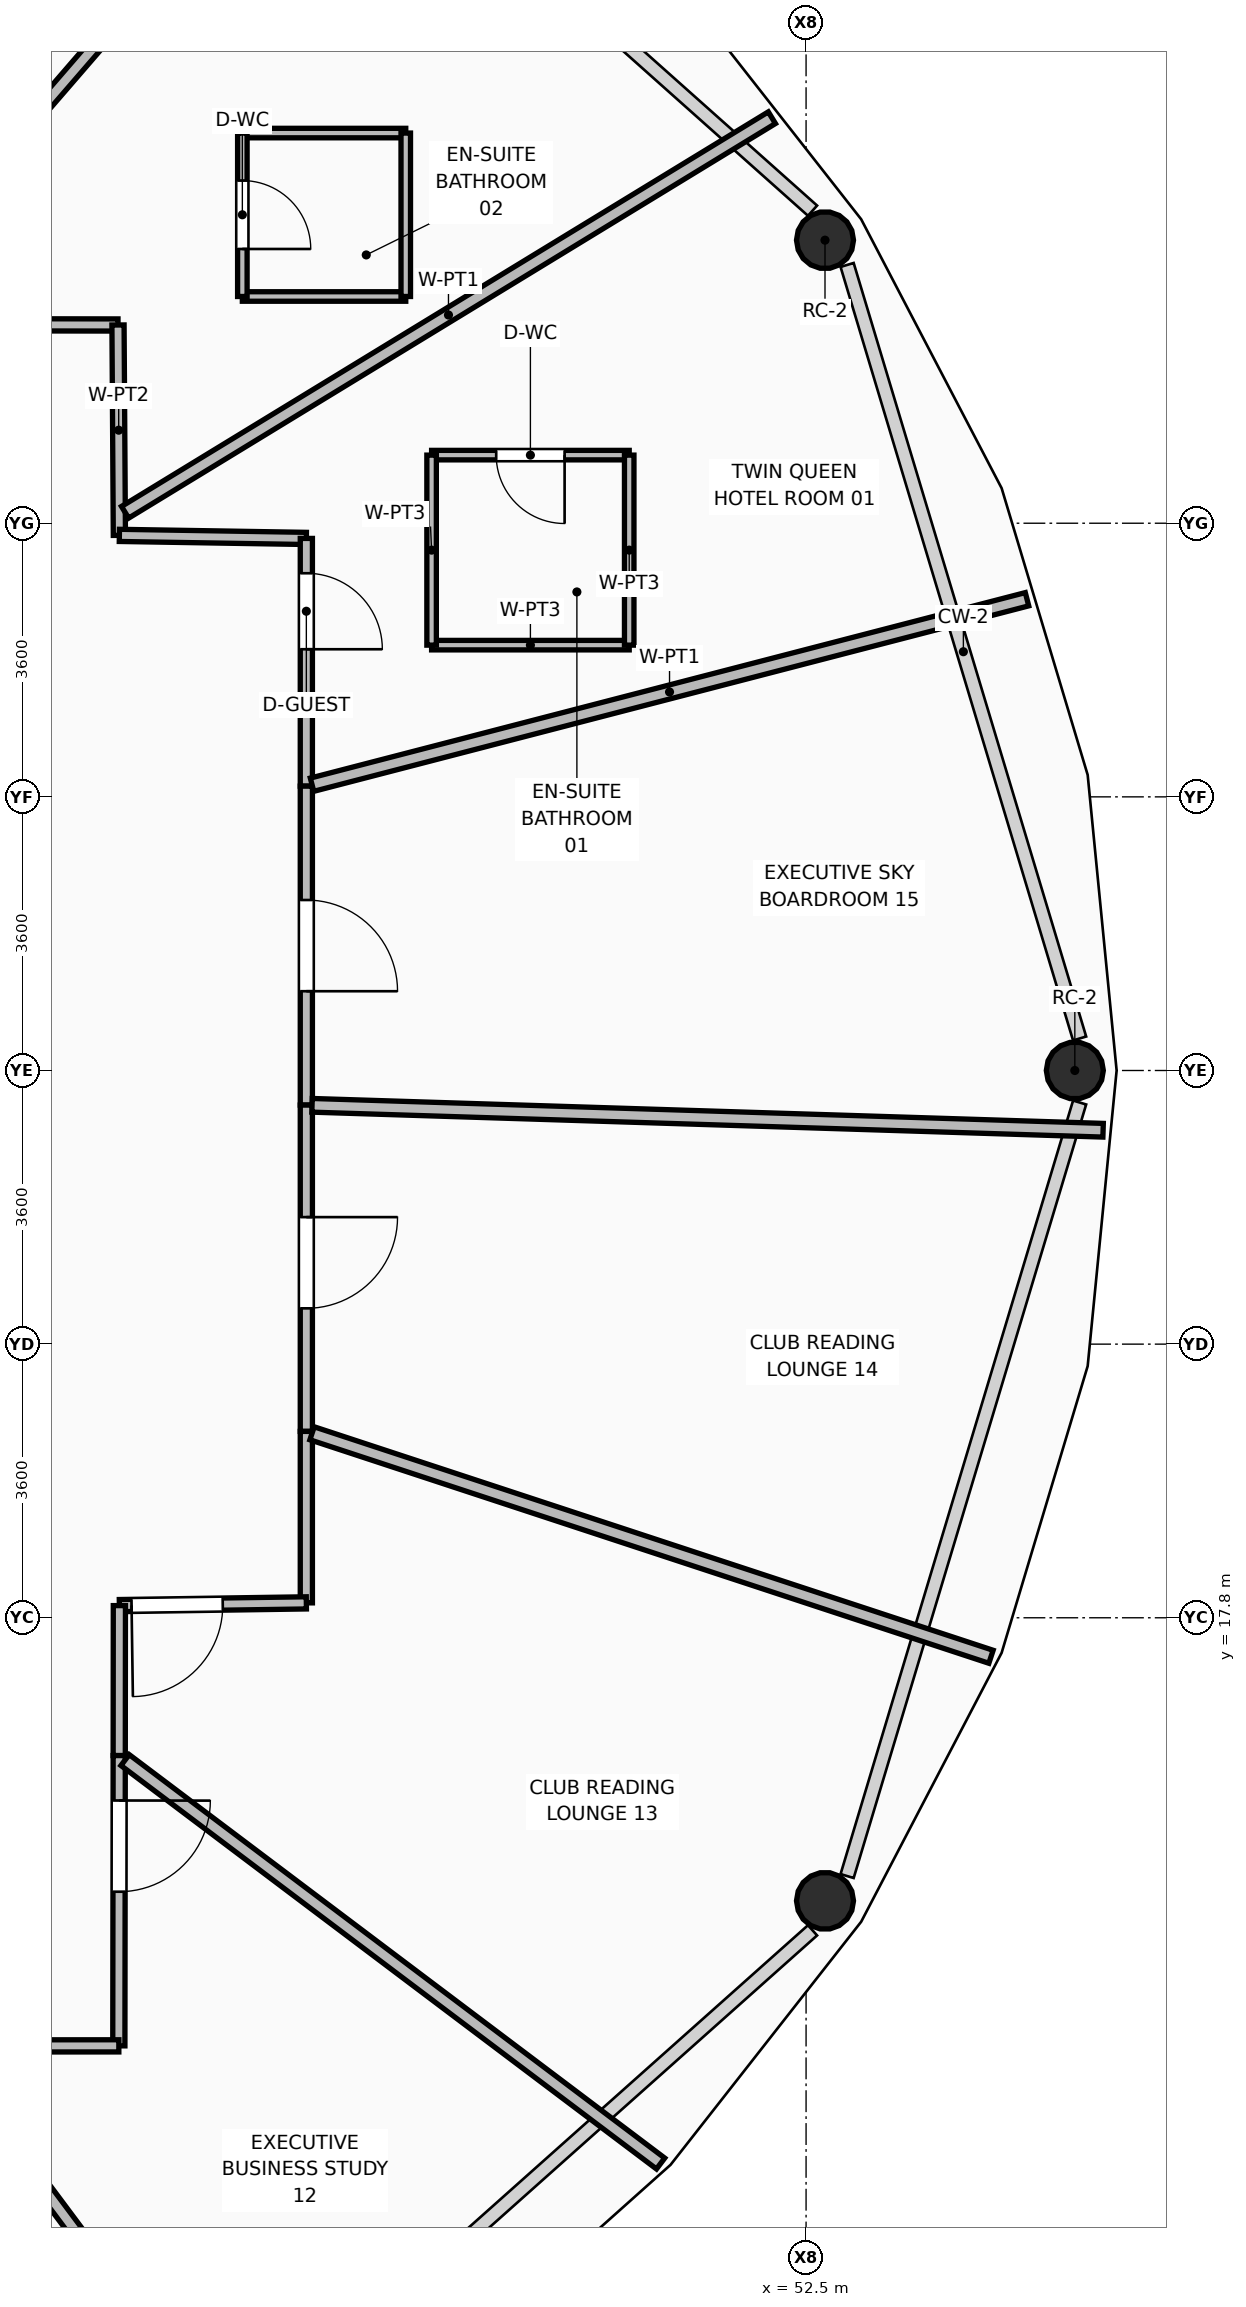
"""IFC4 building model, lengths in metres.
Left out: names, types, materials, properties, quantities, classifications, styles, units other than length and angle.
Written with IfcOpenShell. Run it as: python <this file> out.ifc"""

import sys

from ifc_helpers import new_model, si_unit, direction, frame, frame_2d, origin, origin_2d, place, context, subcontext, project, spatial, rectangle, hollow_circle, extrude, element, fill, save


model = new_model("IFC4")
c1 = context("Model", 3, precision=1e-05, world=origin(), true_north=direction((0.0, 1.0)))
c2 = subcontext(c1, "Body", "Model", "MODEL_VIEW")
j1 = project(units=[si_unit("LENGTHUNIT", "METRE"), si_unit("PLANEANGLEUNIT", "RADIAN")], contexts=[c1])
p1 = place(None, origin())
s1 = spatial("IfcSite", under=j1, at=p1, CompositionType="ELEMENT")
p2 = place(p1, origin())
s2 = spatial("IfcBuilding", under=s1, at=p2, CompositionType="ELEMENT")
p3 = place(p2, frame((0.0, 0.0, 164.7)))
s3 = spatial("IfcBuildingStorey", under=s2, at=p3, CompositionType="ELEMENT", Elevation=164.7)
for number, where, z_axis, x_axis in (
    (1, (56.036, 25.0, 0.0), (0.0, 0.0, 1.0), (1.0, 0.0, 0.0)),
    (2, (52.749, 35.924, 0.0), (0.0, 0.0, 1.0), (1.0, 0.0, 0.0)),
    (3, (52.749, 14.076, 0.0), (0.0, 0.0, 1.0), (1.0, 0.0, 0.0)),
):
    element("IfcColumn", number, at=place(p3, frame(where, z_axis=z_axis, x_axis=x_axis)), inside=s3, PredefinedType="COLUMN", context=c2, shape_type="SweptSolid", body=[
        extrude(hollow_circle(Radius=0.375, WallThickness=0.035, at=origin_2d()), origin(), (0.0, 0.0, 1.0), 3.57),
    ])
p4 = place(p3, frame((39.978, 34.813, 0.0), z_axis=(0.0, 0.0, 1.0), x_axis=(0.999999009391, -0.001407557195, 0.0)))
e4 = element("IfcWall", 4, at=p4, inside=s3, PredefinedType="PARTITIONING", context=c2, shape_type="SweptSolid", body=[
    extrude(rectangle(XDim=3.469, YDim=0.16, at=frame_2d((1.734, 0.0))), origin(), (0.0, 0.0, 1.0), 3.006),
])
p5 = place(p4, frame((0.733, 0.0, 0.0)))
e5 = element("IfcOpeningElement", 5, at=p5, cuts=e4, PredefinedType="OPENING", context=c2, shape_type="SweptSolid", body=[
    extrude(rectangle(XDim=1.0, YDim=2.1, at=frame_2d((0.5, 1.05))), frame((0.0, 0.09, 0.0), z_axis=(0.0, -1.0, 0.0), x_axis=(1.0, 0.0, 0.0)), (0.0, 0.0, 1.0), 0.18),
])
p6 = place(p3, frame((43.447, 34.808, 0.0), z_axis=(0.0, 0.0, 1.0), x_axis=(0.006526585281, -0.999978701615, 0.0)))
e6 = element("IfcWall", 6, at=p6, inside=s3, PredefinedType="PARTITIONING", context=c2, shape_type="SweptSolid", body=[
    extrude(rectangle(XDim=2.768, YDim=0.16, at=frame_2d((1.384, 0.0))), origin(), (0.0, 0.0, 1.0), 3.006),
])
p7 = place(p3, frame((43.465, 32.04, 0.0), z_axis=(0.0, 0.0, 1.0), x_axis=(0.999867567339, -0.016274144605, 0.0)))
e7 = element("IfcWall", 7, at=p7, inside=s3, PredefinedType="PARTITIONING", context=c2, shape_type="SweptSolid", body=[
    extrude(rectangle(XDim=2.46, YDim=0.16, at=frame_2d((1.23, 0.0))), origin(), (0.0, 0.0, 1.0), 3.55),
])
p8 = place(p3, frame((45.925, 32.0, 0.0), z_axis=(0.0, 0.0, 1.0), x_axis=(0.0, -1.0, 0.0)))
e8 = element("IfcWall", 8, at=p8, inside=s3, PredefinedType="PARTITIONING", context=c2, shape_type="SweptSolid", body=[
    extrude(rectangle(XDim=3.259, YDim=0.16, at=frame_2d((1.629, 0.0))), origin(), (0.0, 0.0, 1.0), 3.55),
])
p9 = place(p8, frame((0.458, 0.0, 0.0)))
e9 = element("IfcOpeningElement", 9, at=p9, cuts=e8, PredefinedType="OPENING", context=c2, shape_type="SweptSolid", body=[
    extrude(rectangle(XDim=1.0, YDim=2.1, at=frame_2d((0.5, 1.05))), frame((0.0, 0.09, 0.0), z_axis=(0.0, -1.0, 0.0), x_axis=(1.0, 0.0, 0.0)), (0.0, 0.0, 1.0), 0.18),
])
p10 = place(p3, frame((45.925, 28.741, 0.0), z_axis=(0.0, 0.0, 1.0), x_axis=(0.0, -1.0, 0.0)))
e10 = element("IfcWall", 10, at=p10, inside=s3, PredefinedType="PARTITIONING", context=c2, shape_type="SweptSolid", body=[
    extrude(rectangle(XDim=4.196, YDim=0.16, at=frame_2d((2.098, 0.0))), origin(), (0.0, 0.0, 1.0), 3.55),
])
p11 = place(p10, frame((1.498, 0.0, 0.0)))
e11 = element("IfcOpeningElement", 11, at=p11, cuts=e10, PredefinedType="OPENING", context=c2, shape_type="SweptSolid", body=[
    extrude(rectangle(XDim=1.2, YDim=2.1, at=frame_2d((0.6, 1.05))), frame((0.0, 0.09, 0.0), z_axis=(0.0, -1.0, 0.0), x_axis=(1.0, 0.0, 0.0)), (0.0, 0.0, 1.0), 0.18),
])
p12 = place(p3, frame((45.925, 24.545, 0.0), z_axis=(0.0, 0.0, 1.0), x_axis=(0.0, -1.0, 0.0)))
e12 = element("IfcWall", 12, at=p12, inside=s3, PredefinedType="PARTITIONING", context=c2, shape_type="SweptSolid", body=[
    extrude(rectangle(XDim=4.293, YDim=0.16, at=frame_2d((2.146, 0.0))), origin(), (0.0, 0.0, 1.0), 3.006),
])
p13 = place(p12, frame((1.474, 0.0, 0.0)))
e13 = element("IfcOpeningElement", 13, at=p13, cuts=e12, PredefinedType="OPENING", context=c2, shape_type="SweptSolid", body=[
    extrude(rectangle(XDim=1.2, YDim=2.1, at=frame_2d((0.6, 1.05))), frame((0.0, 0.09, 0.0), z_axis=(0.0, -1.0, 0.0), x_axis=(1.0, 0.0, 0.0)), (0.0, 0.0, 1.0), 0.18),
])
p14 = place(p3, frame((45.925, 20.252, 0.0), z_axis=(0.0, 0.0, 1.0), x_axis=(0.0, -1.0, 0.0)))
e14 = element("IfcWall", 14, at=p14, inside=s3, PredefinedType="PARTITIONING", context=c2, shape_type="SweptSolid", body=[
    extrude(rectangle(XDim=2.256, YDim=0.16, at=frame_2d((1.128, 0.0))), origin(), (0.0, 0.0, 1.0), 3.55),
])
p15 = place(p3, frame((45.925, 17.996, 0.0), z_axis=(0.0, 0.0, 1.0), x_axis=(-0.999892143369, -0.014686784162, 0.0)))
e15 = element("IfcWall", 15, at=p15, inside=s3, PredefinedType="PARTITIONING", context=c2, shape_type="SweptSolid", body=[
    extrude(rectangle(XDim=2.46, YDim=0.16, at=frame_2d((1.23, 0.0))), origin(), (0.0, 0.0, 1.0), 3.55),
])
p16 = place(p15, frame((1.1, 0.0, 0.0)))
e16 = element("IfcOpeningElement", 16, at=p16, cuts=e15, PredefinedType="OPENING", context=c2, shape_type="SweptSolid", body=[
    extrude(rectangle(XDim=1.2, YDim=2.1, at=frame_2d((0.6, 1.05))), frame((0.0, 0.09, 0.0), z_axis=(0.0, -1.0, 0.0), x_axis=(1.0, 0.0, 0.0)), (0.0, 0.0, 1.0), 0.18),
])
p17 = place(p3, frame((43.465, 17.96, 0.0), z_axis=(0.0, 0.0, 1.0), x_axis=(-0.001113722858, -0.999999379811, 0.0)))
e17 = element("IfcWall", 17, at=p17, inside=s3, PredefinedType="PARTITIONING", context=c2, shape_type="SweptSolid", body=[
    extrude(rectangle(XDim=1.973, YDim=0.16, at=frame_2d((0.986, 0.0))), origin(), (0.0, 0.0, 1.0), 3.006),
])
p18 = place(p3, frame((43.463, 15.987, 0.0), z_axis=(0.0, 0.0, 1.0), x_axis=(-0.001278526092, -0.999999182685, 0.0)))
e18 = element("IfcWall", 18, at=p18, inside=s3, PredefinedType="PARTITIONING", context=c2, shape_type="SweptSolid", body=[
    extrude(rectangle(XDim=3.819, YDim=0.16, at=frame_2d((1.91, 0.0))), origin(), (0.0, 0.0, 1.0), 3.55),
])
p19 = place(p18, frame((0.591, 0.0, 0.0)))
e19 = element("IfcOpeningElement", 19, at=p19, cuts=e18, PredefinedType="OPENING", context=c2, shape_type="SweptSolid", body=[
    extrude(rectangle(XDim=1.2, YDim=2.1, at=frame_2d((0.6, 1.05))), frame((0.0, 0.09, 0.0), z_axis=(0.0, -1.0, 0.0), x_axis=(1.0, 0.0, 0.0)), (0.0, 0.0, 1.0), 0.18),
])
p20 = place(p3, frame((43.458, 12.168, 0.0), z_axis=(0.0, 0.0, 1.0), x_axis=(-0.99999991624, -0.000409290869, 0.0)))
e20 = element("IfcWall", 20, at=p20, inside=s3, PredefinedType="PARTITIONING", context=c2, shape_type="SweptSolid", body=[
    extrude(rectangle(XDim=2.386, YDim=0.16, at=frame_2d((1.193, 0.0))), origin(), (0.0, 0.0, 1.0), 3.006),
])
p21 = place(p3, frame((46.0, 28.76, 0.0), z_axis=(0.0, 0.0, 1.0), x_axis=(0.96796954255, 0.251067649639, 0.0)))
e21 = element("IfcWall", 21, at=p21, inside=s3, PredefinedType="PARTITIONING", context=c2, shape_type="SweptSolid", body=[
    extrude(rectangle(XDim=9.718, YDim=0.18, at=frame_2d((4.859, 0.0))), origin(), (0.0, 0.0, 1.0), 2.852),
])
p22 = place(p3, frame((43.54, 32.344, 0.0), z_axis=(0.0, 0.0, 1.0), x_axis=(0.853711993856, 0.520745457537, 0.0)))
e22 = element("IfcWall", 22, at=p22, inside=s3, PredefinedType="PARTITIONING", context=c2, shape_type="SweptSolid", body=[
    extrude(rectangle(XDim=9.968, YDim=0.18, at=frame_2d((4.984, 0.0))), origin(), (0.0, 0.0, 1.0), 2.852),
])
p23 = place(p3, frame((40.044, 34.89, 0.0), z_axis=(0.0, 0.0, 1.0), x_axis=(0.653771871809, 0.756691707125, 0.0)))
e23 = element("IfcWall", 23, at=p23, inside=s3, PredefinedType="PARTITIONING", context=c2, shape_type="SweptSolid", body=[
    extrude(rectangle(XDim=10.203, YDim=0.18, at=frame_2d((5.101, 0.0))), origin(), (0.0, 0.0, 1.0), 2.852),
])
p24 = place(p3, frame((41.14, 12.075, 0.0), z_axis=(0.0, 0.0, 1.0), x_axis=(0.597946680124, -0.8015358805, 0.0)))
e24 = element("IfcWall", 24, at=p24, inside=s3, PredefinedType="PARTITIONING", context=c2, shape_type="SweptSolid", body=[
    extrude(rectangle(XDim=6.95, YDim=0.18, at=frame_2d((3.475, 0.0))), origin(), (0.0, 0.0, 1.0), 2.852),
])
p25 = place(p3, frame((43.54, 15.928, 0.0), z_axis=(0.0, 0.0, 1.0), x_axis=(0.798722893144, -0.601699044347, 0.0)))
e25 = element("IfcWall", 25, at=p25, inside=s3, PredefinedType="PARTITIONING", context=c2, shape_type="SweptSolid", body=[
    extrude(rectangle(XDim=8.822, YDim=0.18, at=frame_2d((4.411, 0.0))), origin(), (0.0, 0.0, 1.0), 2.852),
])
p26 = place(p3, frame((46.0, 20.227, 0.0), z_axis=(0.0, 0.0, 1.0), x_axis=(0.949880965401, -0.312611822502, 0.0)))
e26 = element("IfcWall", 26, at=p26, inside=s3, PredefinedType="PARTITIONING", context=c2, shape_type="SweptSolid", body=[
    extrude(rectangle(XDim=9.405, YDim=0.18, at=frame_2d((4.702, 0.0))), origin(), (0.0, 0.0, 1.0), 2.852),
])
p27 = place(p3, frame((46.0, 24.542, 0.0), z_axis=(0.0, 0.0, 1.0), x_axis=(0.999504152782, -0.031487276329, 0.0)))
e27 = element("IfcWall", 27, at=p27, inside=s3, PredefinedType="PARTITIONING", context=c2, shape_type="SweptSolid", body=[
    extrude(rectangle(XDim=10.413, YDim=0.18, at=frame_2d((5.207, 0.0))), origin(), (0.0, 0.0, 1.0), 2.852),
])
p28 = place(p3, frame((47.573, 30.596, 0.0), z_axis=(0.0, 0.0, 1.0), x_axis=(1.0, 0.0, 0.0)))
e28 = element("IfcWall", 28, at=p28, inside=s3, PredefinedType="PARTITIONING", context=c2, shape_type="SweptSolid", body=[
    extrude(rectangle(XDim=2.6, YDim=0.125, at=frame_2d((1.3, 0.0))), origin(), (0.0, 0.0, 1.0), 3.55),
])
p29 = place(p3, frame((47.573, 33.096, 0.0), z_axis=(0.0, 0.0, 1.0), x_axis=(1.0, 0.0, 0.0)))
e29 = element("IfcWall", 29, at=p29, inside=s3, PredefinedType="PARTITIONING", context=c2, shape_type="SweptSolid", body=[
    extrude(rectangle(XDim=2.6, YDim=0.125, at=frame_2d((1.3, 0.0))), origin(), (0.0, 0.0, 1.0), 3.55),
])
p30 = place(p29, frame((0.85, 0.0, 0.0)))
e30 = element("IfcOpeningElement", 30, at=p30, cuts=e29, PredefinedType="OPENING", context=c2, shape_type="SweptSolid", body=[
    extrude(rectangle(XDim=0.9, YDim=2.1, at=frame_2d((0.45, 1.05))), frame((0.0, 0.073, 0.0), z_axis=(0.0, -1.0, 0.0), x_axis=(1.0, 0.0, 0.0)), (0.0, 0.0, 1.0), 0.145),
])
for number, where, z_axis, x_axis in (
    (31, (47.573, 30.596, 0.0), (0.0, 0.0, 1.0), (0.0, 1.0, 0.0)),
    (32, (50.173, 30.596, 0.0), (0.0, 0.0, 1.0), (0.0, 1.0, 0.0)),
):
    element("IfcWall", number, at=place(p3, frame(where, z_axis=z_axis, x_axis=x_axis)), inside=s3, PredefinedType="PARTITIONING", context=c2, shape_type="SweptSolid", body=[
        extrude(rectangle(XDim=2.5, YDim=0.125, at=frame_2d((1.25, 0.0))), origin(), (0.0, 0.0, 1.0), 3.55),
    ])
for number, where, z_axis, x_axis in (
    (33, (45.083, 35.183, 0.0), (0.0, 0.0, 1.0), (1.0, 0.0, 0.0)),
    (34, (45.083, 37.333, 0.0), (0.0, 0.0, 1.0), (1.0, 0.0, 0.0)),
):
    element("IfcWall", number, at=place(p3, frame(where, z_axis=z_axis, x_axis=x_axis)), inside=s3, PredefinedType="PARTITIONING", context=c2, shape_type="SweptSolid", body=[
        extrude(rectangle(XDim=2.15, YDim=0.125, at=frame_2d((1.075, 0.0))), origin(), (0.0, 0.0, 1.0), 3.55),
    ])
p31 = place(p3, frame((45.083, 35.183, 0.0), z_axis=(0.0, 0.0, 1.0), x_axis=(0.0, 1.0, 0.0)))
e35 = element("IfcWall", 35, at=p31, inside=s3, PredefinedType="PARTITIONING", context=c2, shape_type="SweptSolid", body=[
    extrude(rectangle(XDim=2.15, YDim=0.125, at=frame_2d((1.075, 0.0))), origin(), (0.0, 0.0, 1.0), 3.55),
])
p32 = place(p31, frame((0.625, 0.0, 0.0)))
e36 = element("IfcOpeningElement", 36, at=p32, cuts=e35, PredefinedType="OPENING", context=c2, shape_type="SweptSolid", body=[
    extrude(rectangle(XDim=0.9, YDim=2.1, at=frame_2d((0.45, 1.05))), frame((0.0, 0.073, 0.0), z_axis=(0.0, -1.0, 0.0), x_axis=(1.0, 0.0, 0.0)), (0.0, 0.0, 1.0), 0.145),
])
p33 = place(p3, frame((47.233, 35.183, 0.0), z_axis=(0.0, 0.0, 1.0), x_axis=(0.0, 1.0, 0.0)))
e37 = element("IfcWall", 37, at=p33, inside=s3, PredefinedType="PARTITIONING", context=c2, shape_type="SweptSolid", body=[
    extrude(rectangle(XDim=2.15, YDim=0.125, at=frame_2d((1.075, 0.0))), origin(), (0.0, 0.0, 1.0), 3.55),
])
p34 = place(p30, frame((0.9, 0.0, 0.0), z_axis=(0.0, 0.0, 1.0), x_axis=(-1.0, 0.0, 0.0)))
e38 = element("IfcDoor", 38, at=p34, inside=s3, OperationType="SINGLE_SWING_LEFT", PredefinedType="DOOR", context=c2, shape_type="SweptSolid", body=[
    extrude(rectangle(XDim=0.9, YDim=2.1, at=frame_2d((0.45, 1.05))), frame((0.0, 0.025, 0.0), z_axis=(0.0, -1.0, 0.0), x_axis=(1.0, 0.0, 0.0)), (0.0, 0.0, 1.0), 0.05),
])
fill(e30, e38)
p35 = place(p9, origin())
e39 = element("IfcDoor", 39, at=p35, inside=s3, OperationType="SINGLE_SWING_RIGHT", PredefinedType="DOOR", context=c2, shape_type="SweptSolid", body=[
    extrude(rectangle(XDim=1.0, YDim=2.1, at=frame_2d((0.5, 1.05))), frame((0.0, 0.025, 0.0), z_axis=(0.0, -1.0, 0.0), x_axis=(1.0, 0.0, 0.0)), (0.0, 0.0, 1.0), 0.05),
])
fill(e9, e39)
p36 = place(p32, frame((0.9, 0.0, 0.0), z_axis=(0.0, 0.0, 1.0), x_axis=(-1.0, 0.0, 0.0)))
e40 = element("IfcDoor", 40, at=p36, inside=s3, OperationType="SINGLE_SWING_RIGHT", PredefinedType="DOOR", context=c2, shape_type="SweptSolid", body=[
    extrude(rectangle(XDim=0.9, YDim=2.1, at=frame_2d((0.45, 1.05))), frame((0.0, 0.025, 0.0), z_axis=(0.0, -1.0, 0.0), x_axis=(1.0, 0.0, 0.0)), (0.0, 0.0, 1.0), 0.05),
])
fill(e36, e40)
p37 = place(p19, origin())
e41 = element("IfcDoor", 41, at=p37, inside=s3, OperationType="SINGLE_SWING_LEFT", PredefinedType="DOOR", context=c2, shape_type="SweptSolid", body=[
    extrude(rectangle(XDim=1.2, YDim=2.1, at=frame_2d((0.6, 1.05))), frame((0.0, 0.025, 0.0), z_axis=(0.0, -1.0, 0.0), x_axis=(1.0, 0.0, 0.0)), (0.0, 0.0, 1.0), 0.05),
])
fill(e19, e41)
p38 = place(p16, origin())
e42 = element("IfcDoor", 42, at=p38, inside=s3, OperationType="SINGLE_SWING_RIGHT", PredefinedType="DOOR", context=c2, shape_type="SweptSolid", body=[
    extrude(rectangle(XDim=1.2, YDim=2.1, at=frame_2d((0.6, 1.05))), frame((0.0, 0.025, 0.0), z_axis=(0.0, -1.0, 0.0), x_axis=(1.0, 0.0, 0.0)), (0.0, 0.0, 1.0), 0.05),
])
fill(e16, e42)
p39 = place(p13, origin())
e43 = element("IfcDoor", 43, at=p39, inside=s3, OperationType="SINGLE_SWING_LEFT", PredefinedType="DOOR", context=c2, shape_type="SweptSolid", body=[
    extrude(rectangle(XDim=1.2, YDim=2.1, at=frame_2d((0.6, 1.05))), frame((0.0, 0.025, 0.0), z_axis=(0.0, -1.0, 0.0), x_axis=(1.0, 0.0, 0.0)), (0.0, 0.0, 1.0), 0.05),
])
fill(e13, e43)
p40 = place(p11, origin())
e44 = element("IfcDoor", 44, at=p40, inside=s3, OperationType="SINGLE_SWING_RIGHT", PredefinedType="DOOR", context=c2, shape_type="SweptSolid", body=[
    extrude(rectangle(XDim=1.2, YDim=2.1, at=frame_2d((0.6, 1.05))), frame((0.0, 0.025, 0.0), z_axis=(0.0, -1.0, 0.0), x_axis=(1.0, 0.0, 0.0)), (0.0, 0.0, 1.0), 0.05),
])
fill(e11, e44)
save(model, sys.argv[1])
